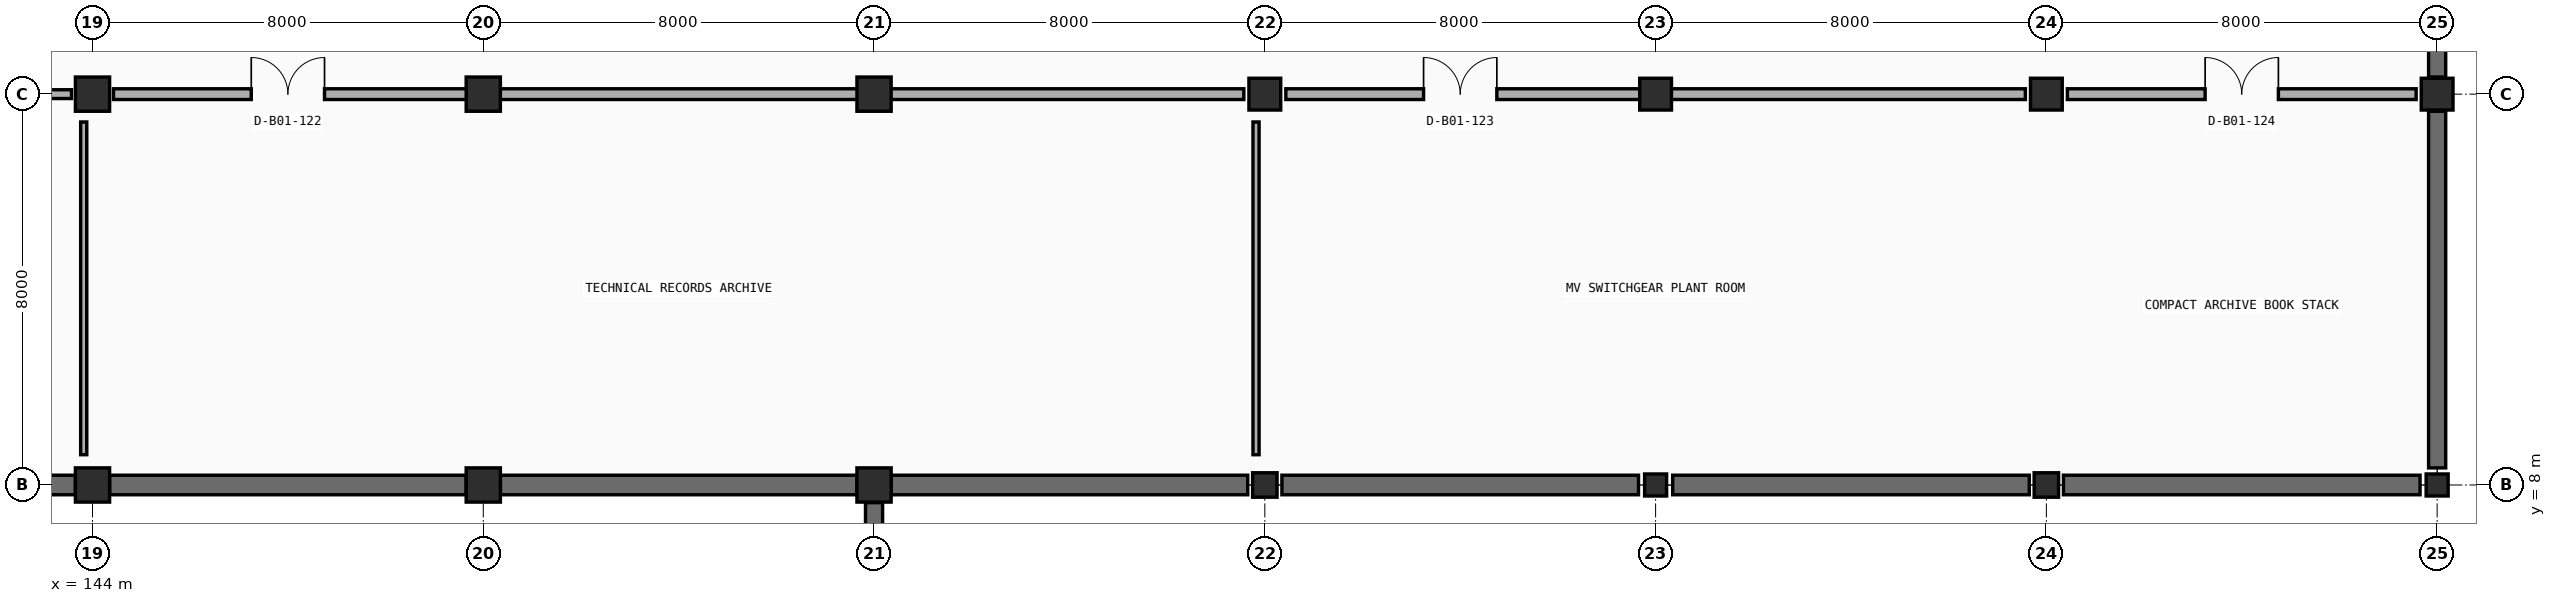
"""IFC4 building model, lengths in metres.
Left out: names, types, materials, properties, quantities, classifications, styles, units other than length and angle.
Written with IfcOpenShell. Run it as: python <this file> out.ifc"""

import sys

from ifc_helpers import new_model, si_unit, direction, frame, frame_2d, origin, origin_2d, place, context, subcontext, project, spatial, rectangle, extrude, element, fill, save


model = new_model("IFC4")
c1 = context("Model", 3, precision=1e-05, world=origin(), true_north=direction((0.0, 1.0)))
c2 = subcontext(c1, "Body", "Model", "MODEL_VIEW")
j1 = project(units=[si_unit("LENGTHUNIT", "METRE"), si_unit("PLANEANGLEUNIT", "RADIAN")], contexts=[c1])
p1 = place(None, origin())
s1 = spatial("IfcSite", under=j1, at=p1, CompositionType="ELEMENT")
p2 = place(p1, origin())
s2 = spatial("IfcBuilding", under=s1, at=p2, CompositionType="ELEMENT")
p3 = place(p2, frame((0.0, 0.0, -4.5)))
s3 = spatial("IfcBuildingStorey", under=s2, at=p3, CompositionType="ELEMENT", Elevation=-4.5)
for number, where, z_axis, x_axis in (
    (1, (144.0, 8.0, -0.405), (0.0, 0.0, 1.0), (1.0, 0.0, 0.0)),
    (2, (152.0, 8.0, -0.405), (0.0, 0.0, 1.0), (1.0, 0.0, 0.0)),
    (3, (160.0, 8.0, -0.405), (0.0, 0.0, 1.0), (1.0, 0.0, 0.0)),
):
    element("IfcColumn", number, at=place(p3, frame(where, z_axis=z_axis, x_axis=x_axis)), inside=s3, PredefinedType="COLUMN", context=c2, shape_type="SweptSolid", body=[
        extrude(rectangle(XDim=0.7, YDim=0.7, at=origin_2d()), origin(), (0.0, 0.0, 1.0), 4.905),
    ])
p4 = place(p3, frame((168.0, 8.0, -0.405), z_axis=(0.0, 0.0, 1.0), x_axis=(1.0, 0.0, 0.0)))
e4 = element("IfcColumn", 4, at=p4, inside=s3, PredefinedType="COLUMN", context=c2, shape_type="SweptSolid", body=[
    extrude(rectangle(XDim=0.5, YDim=0.5, at=origin_2d()), origin(), (0.0, 0.0, 1.0), 4.905),
])
p5 = place(p3, frame((176.0, 8.0, -0.405), z_axis=(0.0, 0.0, 1.0), x_axis=(1.0, 0.0, 0.0)))
e5 = element("IfcColumn", 5, at=p5, inside=s3, PredefinedType="COLUMN", context=c2, shape_type="SweptSolid", body=[
    extrude(rectangle(XDim=0.45, YDim=0.45, at=origin_2d()), origin(), (0.0, 0.0, 1.0), 4.905),
])
p6 = place(p3, frame((184.0, 8.0, -0.405), z_axis=(0.0, 0.0, 1.0), x_axis=(1.0, 0.0, 0.0)))
e6 = element("IfcColumn", 6, at=p6, inside=s3, PredefinedType="COLUMN", context=c2, shape_type="SweptSolid", body=[
    extrude(rectangle(XDim=0.5, YDim=0.5, at=origin_2d()), origin(), (0.0, 0.0, 1.0), 4.905),
])
p7 = place(p3, frame((192.0, 8.0, -0.405), z_axis=(0.0, 0.0, 1.0), x_axis=(1.0, 0.0, 0.0)))
e7 = element("IfcColumn", 7, at=p7, inside=s3, PredefinedType="COLUMN", context=c2, shape_type="SweptSolid", body=[
    extrude(rectangle(XDim=0.45, YDim=0.45, at=origin_2d()), origin(), (0.0, 0.0, 1.0), 4.905),
])
for number, where, z_axis, x_axis in (
    (8, (144.0, 16.0, -0.405), (0.0, 0.0, 1.0), (1.0, 0.0, 0.0)),
    (9, (152.0, 16.0, -0.405), (0.0, 0.0, 1.0), (1.0, 0.0, 0.0)),
    (10, (160.0, 16.0, -0.405), (0.0, 0.0, 1.0), (1.0, 0.0, 0.0)),
):
    element("IfcColumn", number, at=place(p3, frame(where, z_axis=z_axis, x_axis=x_axis)), inside=s3, PredefinedType="COLUMN", context=c2, shape_type="SweptSolid", body=[
        extrude(rectangle(XDim=0.7, YDim=0.7, at=origin_2d()), origin(), (0.0, 0.0, 1.0), 4.905),
    ])
for number, where, z_axis, x_axis in (
    (11, (168.0, 16.0, -0.405), (0.0, 0.0, 1.0), (1.0, 0.0, 0.0)),
    (12, (176.0, 16.0, -0.405), (0.0, 0.0, 1.0), (1.0, 0.0, 0.0)),
    (13, (184.0, 16.0, -0.405), (0.0, 0.0, 1.0), (1.0, 0.0, 0.0)),
    (14, (192.0, 16.0, -0.405), (0.0, 0.0, 1.0), (1.0, 0.0, 0.0)),
):
    element("IfcColumn", number, at=place(p3, frame(where, z_axis=z_axis, x_axis=x_axis)), inside=s3, PredefinedType="COLUMN", context=c2, shape_type="SweptSolid", body=[
        extrude(rectangle(XDim=0.65, YDim=0.65, at=origin_2d()), origin(), (0.0, 0.0, 1.0), 4.905),
    ])
for number, where, z_axis, x_axis in (
    (15, (143.65, 8.0, 0.0), (0.0, 0.0, 1.0), (-1.0, 0.0, 0.0)),
    (16, (151.65, 8.0, 0.0), (0.0, 0.0, 1.0), (-1.0, 0.0, 0.0)),
    (17, (159.65, 8.0, 0.0), (0.0, 0.0, 1.0), (-1.0, 0.0, 0.0)),
    (18, (167.65, 8.0, 0.0), (0.0, 0.0, 1.0), (-1.0, 0.0, 0.0)),
    (19, (175.65, 8.0, 0.0), (0.0, 0.0, 1.0), (-1.0, 0.0, 0.0)),
    (20, (183.65, 8.0, 0.0), (0.0, 0.0, 1.0), (-1.0, 0.0, 0.0)),
    (21, (191.65, 8.0, 0.0), (0.0, 0.0, 1.0), (-1.0, 0.0, 0.0)),
):
    element("IfcWall", number, at=place(p3, frame(where, z_axis=z_axis, x_axis=x_axis)), inside=s3, PredefinedType="USERDEFINED", context=c2, shape_type="SweptSolid", body=[
        extrude(rectangle(XDim=7.3, YDim=0.4, at=frame_2d((3.65, 0.0))), origin(), (0.0, 0.0, 1.0), 4.095),
    ])
for number, where, z_axis, x_axis in (
    (22, (192.0, 15.65, 0.0), (0.0, 0.0, 1.0), (0.0, -1.0, 0.0)),
    (23, (192.0, 23.65, 0.0), (0.0, 0.0, 1.0), (0.0, -1.0, 0.0)),
):
    element("IfcWall", number, at=place(p3, frame(where, z_axis=z_axis, x_axis=x_axis)), inside=s3, PredefinedType="USERDEFINED", context=c2, shape_type="SweptSolid", body=[
        extrude(rectangle(XDim=7.3, YDim=0.35, at=frame_2d((3.65, 0.0))), origin(), (0.0, 0.0, 1.0), 4.095),
    ])
p8 = place(p3, frame((160.0, 0.312, -0.405), z_axis=(0.0, 0.0, 1.0), x_axis=(0.0, 1.0, 0.0)))
e24 = element("IfcWall", 24, at=p8, inside=s3, PredefinedType="USERDEFINED", context=c2, shape_type="SweptSolid", body=[
    extrude(rectangle(XDim=7.326, YDim=0.35, at=frame_2d((3.663, 0.0))), origin(), (0.0, 0.0, 1.0), 4.495),
])
p9 = place(p3, frame((120.43, 16.0, 0.0), z_axis=(0.0, 0.0, 1.0), x_axis=(1.0, 0.0, 0.0)))
e25 = element("IfcWall", 25, at=p9, inside=s3, PredefinedType="PARTITIONING", context=c2, shape_type="SweptSolid", body=[
    extrude(rectangle(XDim=23.14, YDim=0.18, at=frame_2d((11.57, 0.0))), origin(), (0.0, 0.0, 1.0), 3.37),
])
p10 = place(p9, frame((2.65, 0.0, 0.0)))
e26 = element("IfcOpeningElement", 26, at=p10, cuts=e25, PredefinedType="OPENING", context=c2, shape_type="SweptSolid", body=[
    extrude(rectangle(XDim=1.84, YDim=2.25, at=frame_2d((0.92, 1.125))), frame((0.0, 0.1, 0.0), z_axis=(0.0, -1.0, 0.0), x_axis=(1.0, 0.0, 0.0)), (0.0, 0.0, 1.0), 0.2),
])
p11 = place(p3, frame((143.82, 8.62, 0.0), z_axis=(0.0, 0.0, 1.0), x_axis=(0.0, 1.0, 0.0)))
e27 = element("IfcWall", 27, at=p11, inside=s3, PredefinedType="PARTITIONING", context=c2, shape_type="SweptSolid", body=[
    extrude(rectangle(XDim=6.81, YDim=0.125, at=frame_2d((3.405, 0.0))), origin(), (0.0, 0.0, 1.0), 3.27),
])
p12 = place(p3, frame((144.43, 16.0, 0.0), z_axis=(0.0, 0.0, 1.0), x_axis=(1.0, 0.0, 0.0)))
e28 = element("IfcWall", 28, at=p12, inside=s3, PredefinedType="PARTITIONING", context=c2, shape_type="SweptSolid", body=[
    extrude(rectangle(XDim=23.14, YDim=0.22, at=frame_2d((11.57, 0.0))), origin(), (0.0, 0.0, 1.0), 3.365),
])
p13 = place(p12, frame((2.82, 0.0, 0.0)))
e29 = element("IfcOpeningElement", 29, at=p13, cuts=e28, PredefinedType="OPENING", context=c2, shape_type="SweptSolid", body=[
    extrude(rectangle(XDim=1.5, YDim=2.2, at=frame_2d((0.75, 1.1))), frame((0.0, 0.12, 0.0), z_axis=(0.0, -1.0, 0.0), x_axis=(1.0, 0.0, 0.0)), (0.0, 0.0, 1.0), 0.24),
])
p14 = place(p3, frame((167.82, 8.62, 0.0), z_axis=(0.0, 0.0, 1.0), x_axis=(0.0, 1.0, 0.0)))
e30 = element("IfcWall", 30, at=p14, inside=s3, PredefinedType="PARTITIONING", context=c2, shape_type="SweptSolid", body=[
    extrude(rectangle(XDim=6.81, YDim=0.125, at=frame_2d((3.405, 0.0))), origin(), (0.0, 0.0, 1.0), 3.387),
])
p15 = place(p3, frame((168.43, 16.0, 0.0), z_axis=(0.0, 0.0, 1.0), x_axis=(1.0, 0.0, 0.0)))
e31 = element("IfcWall", 31, at=p15, inside=s3, PredefinedType="PARTITIONING", context=c2, shape_type="SweptSolid", body=[
    extrude(rectangle(XDim=15.14, YDim=0.22, at=frame_2d((7.57, 0.0))), origin(), (0.0, 0.0, 1.0), 3.365),
])
p16 = place(p15, frame((2.82, 0.0, 0.0)))
e32 = element("IfcOpeningElement", 32, at=p16, cuts=e31, PredefinedType="OPENING", context=c2, shape_type="SweptSolid", body=[
    extrude(rectangle(XDim=1.5, YDim=2.2, at=frame_2d((0.75, 1.1))), frame((0.0, 0.12, 0.0), z_axis=(0.0, -1.0, 0.0), x_axis=(1.0, 0.0, 0.0)), (0.0, 0.0, 1.0), 0.24),
])
p17 = place(p3, frame((184.43, 16.0, 0.0), z_axis=(0.0, 0.0, 1.0), x_axis=(1.0, 0.0, 0.0)))
e33 = element("IfcWall", 33, at=p17, inside=s3, PredefinedType="PARTITIONING", context=c2, shape_type="SweptSolid", body=[
    extrude(rectangle(XDim=7.14, YDim=0.22, at=frame_2d((3.57, 0.0))), origin(), (0.0, 0.0, 1.0), 3.365),
])
p18 = place(p17, frame((2.82, 0.0, 0.0)))
e34 = element("IfcOpeningElement", 34, at=p18, cuts=e33, PredefinedType="OPENING", context=c2, shape_type="SweptSolid", body=[
    extrude(rectangle(XDim=1.5, YDim=2.2, at=frame_2d((0.75, 1.1))), frame((0.0, 0.12, 0.0), z_axis=(0.0, -1.0, 0.0), x_axis=(1.0, 0.0, 0.0)), (0.0, 0.0, 1.0), 0.24),
])
p19 = place(p13, origin())
e35 = element("IfcDoor", 35, at=p19, inside=s3, OperationType="DOUBLE_DOOR_SINGLE_SWING", PredefinedType="DOOR", context=c2, shape_type="SweptSolid", body=[
    extrude(rectangle(XDim=1.5, YDim=2.2, at=frame_2d((0.75, 1.1))), frame((0.0, 0.025, 0.0), z_axis=(0.0, -1.0, 0.0), x_axis=(1.0, 0.0, 0.0)), (0.0, 0.0, 1.0), 0.05),
])
fill(e29, e35)
p20 = place(p16, origin())
e36 = element("IfcDoor", 36, at=p20, inside=s3, OperationType="DOUBLE_DOOR_SINGLE_SWING", PredefinedType="DOOR", context=c2, shape_type="SweptSolid", body=[
    extrude(rectangle(XDim=1.5, YDim=2.2, at=frame_2d((0.75, 1.1))), frame((0.0, 0.025, 0.0), z_axis=(0.0, -1.0, 0.0), x_axis=(1.0, 0.0, 0.0)), (0.0, 0.0, 1.0), 0.05),
])
fill(e32, e36)
p21 = place(p18, origin())
e37 = element("IfcDoor", 37, at=p21, inside=s3, OperationType="DOUBLE_DOOR_SINGLE_SWING", PredefinedType="DOOR", context=c2, shape_type="SweptSolid", body=[
    extrude(rectangle(XDim=1.5, YDim=2.2, at=frame_2d((0.75, 1.1))), frame((0.0, 0.025, 0.0), z_axis=(0.0, -1.0, 0.0), x_axis=(1.0, 0.0, 0.0)), (0.0, 0.0, 1.0), 0.05),
])
fill(e34, e37)
save(model, sys.argv[1])
